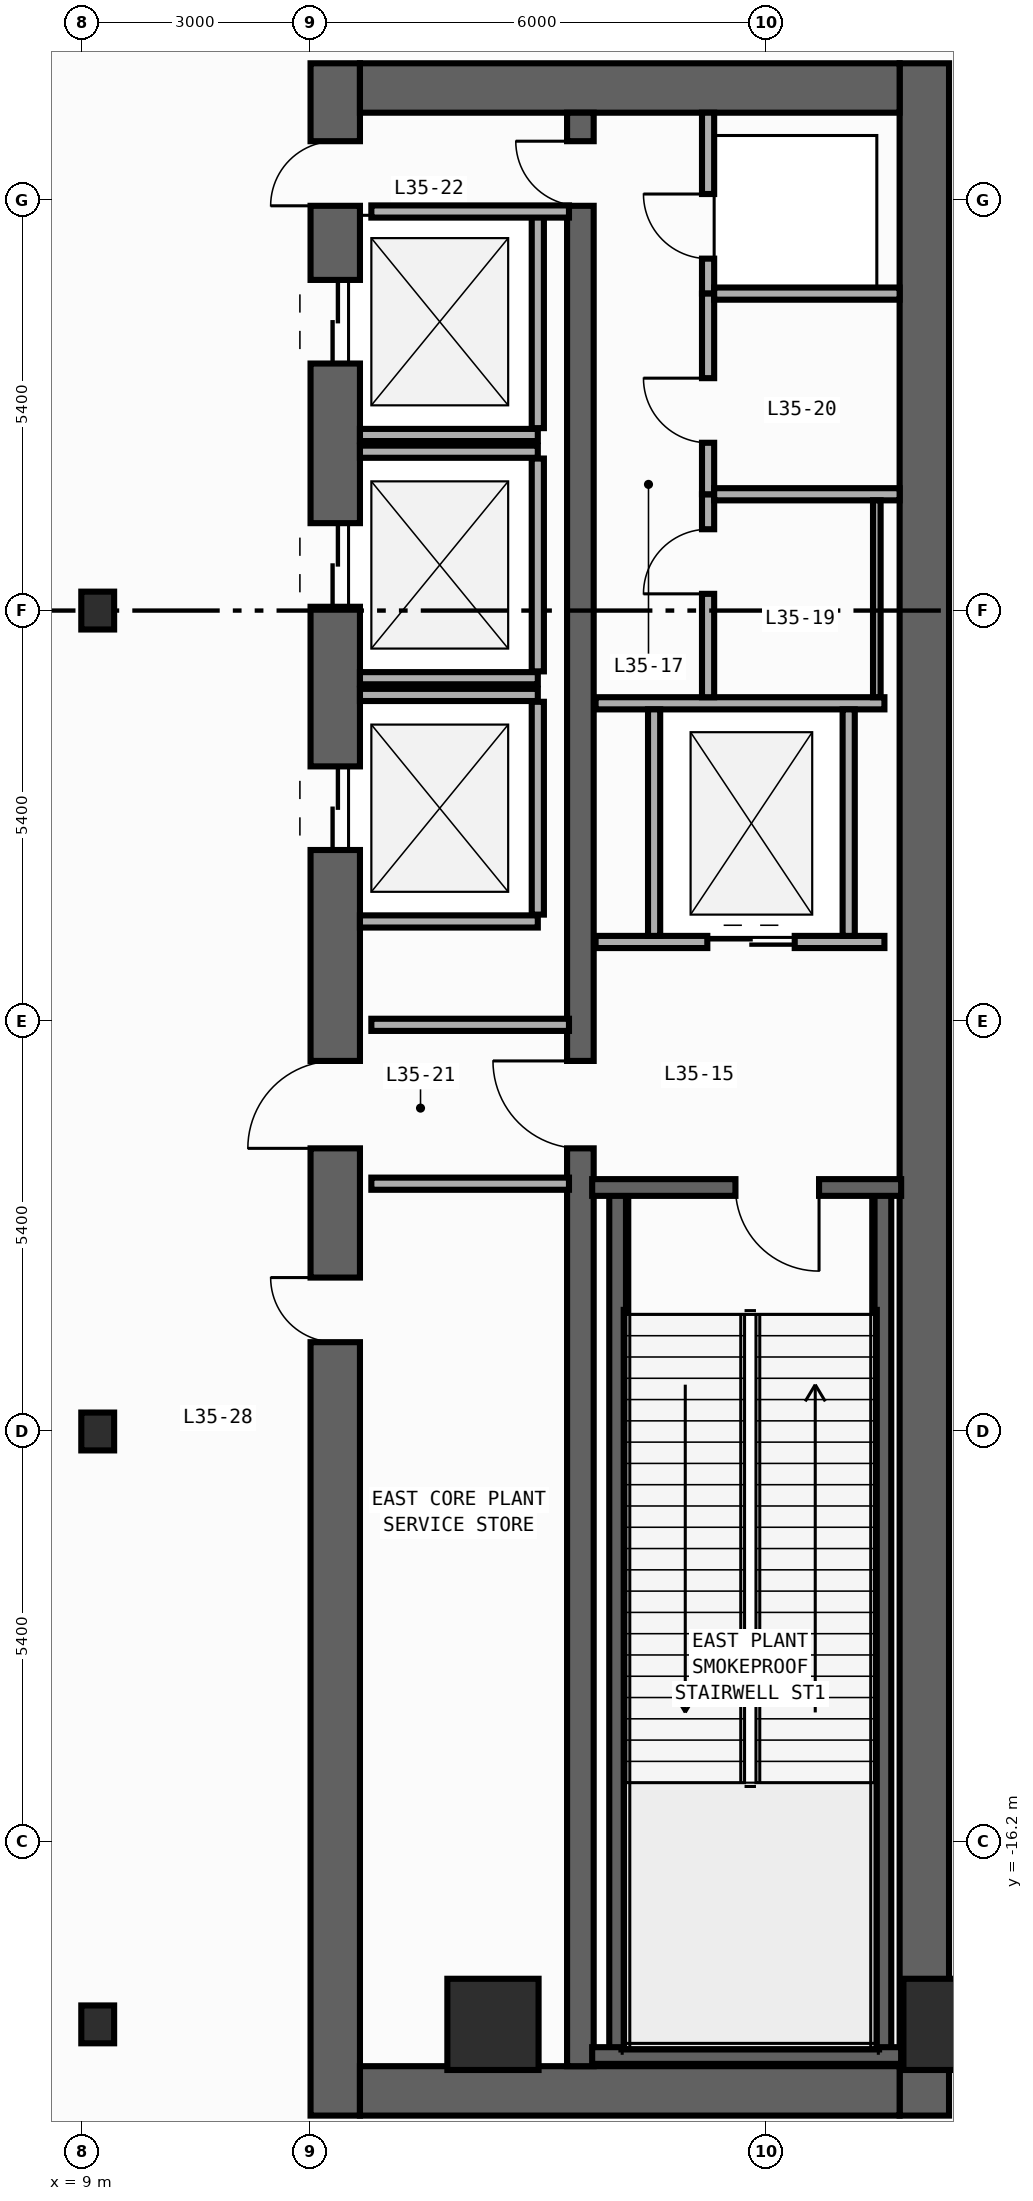
"""IFC4 building model, lengths in metres.
Left out: names, types, materials, properties, quantities, classifications, styles, units other than length and angle.
Written with IfcOpenShell. Run it as: python <this file> out.ifc"""

import sys

from ifc_helpers import new_model, si_unit, direction, frame, frame_2d, origin, origin_2d, place, context, subcontext, project, spatial, rectangle, i_section, extrude, element, fill, save


model = new_model("IFC4")
c1 = context("Model", 3, precision=1e-05, world=origin(), true_north=direction((0.0, 1.0)))
c2 = subcontext(c1, "Body", "Model", "MODEL_VIEW")
j1 = project(units=[si_unit("LENGTHUNIT", "METRE"), si_unit("PLANEANGLEUNIT", "RADIAN")], contexts=[c1])
p1 = place(None, origin())
s1 = spatial("IfcSite", under=j1, at=p1, CompositionType="ELEMENT")
p2 = place(p1, origin())
s2 = spatial("IfcBuilding", under=s1, at=p2, CompositionType="ELEMENT")
p3 = place(p2, frame((0.0, 0.0, 152.0)))
s3 = spatial("IfcBuildingStorey", under=s2, at=p3, CompositionType="ELEMENT", Elevation=152.0)
p4 = place(p3, frame((12.325, -19.8, 0.0), z_axis=(0.0, 0.0, 1.0), x_axis=(0.0, 1.0, 0.0)))
e1 = element("IfcWall", 1, at=p4, inside=s3, PredefinedType="SHEAR", context=c2, shape_type="SweptSolid", body=[
    extrude(rectangle(XDim=27.0, YDim=0.65, at=frame_2d((13.5, 0.0))), origin(), (0.0, 0.0, 1.0), 8.14),
])
p5 = place(p4, frame((23.05, 0.0, 0.0)))
e2 = element("IfcOpeningElement", 2, at=p5, cuts=e1, PredefinedType="OPENING", context=c2, shape_type="SweptSolid", body=[
    extrude(rectangle(XDim=1.1, YDim=2.2, at=frame_2d((0.55, 1.1))), frame((0.0, 0.335, 0.0), z_axis=(0.0, -1.0, 0.0), x_axis=(1.0, 0.0, 0.0)), (0.0, 0.0, 1.0), 0.67),
])
p6 = place(p4, frame((19.85, 0.0, 0.0)))
e3 = element("IfcOpeningElement", 3, at=p6, cuts=e1, PredefinedType="OPENING", context=c2, shape_type="SweptSolid", body=[
    extrude(rectangle(XDim=1.1, YDim=2.2, at=frame_2d((0.55, 1.1))), frame((0.0, 0.335, 0.0), z_axis=(0.0, -1.0, 0.0), x_axis=(1.0, 0.0, 0.0)), (0.0, 0.0, 1.0), 0.67),
])
p7 = place(p4, frame((16.65, 0.0, 0.0)))
e4 = element("IfcOpeningElement", 4, at=p7, cuts=e1, PredefinedType="OPENING", context=c2, shape_type="SweptSolid", body=[
    extrude(rectangle(XDim=1.1, YDim=2.2, at=frame_2d((0.55, 1.1))), frame((0.0, 0.335, 0.0), z_axis=(0.0, -1.0, 0.0), x_axis=(1.0, 0.0, 0.0)), (0.0, 0.0, 1.0), 0.67),
])
p8 = place(p4, frame((10.175, 0.0, 0.0)))
e5 = element("IfcOpeningElement", 5, at=p8, cuts=e1, PredefinedType="OPENING", context=c2, shape_type="SweptSolid", body=[
    extrude(rectangle(XDim=0.85, YDim=2.1, at=frame_2d((0.425, 1.05))), frame((0.0, 0.335, 0.0), z_axis=(0.0, -1.0, 0.0), x_axis=(1.0, 0.0, 0.0)), (0.0, 0.0, 1.0), 0.67),
])
p9 = place(p4, frame((12.725, 0.0, 0.0)))
e6 = element("IfcOpeningElement", 6, at=p9, cuts=e1, PredefinedType="OPENING", context=c2, shape_type="SweptSolid", body=[
    extrude(rectangle(XDim=1.15, YDim=2.2, at=frame_2d((0.575, 1.1))), frame((0.0, 0.335, 0.0), z_axis=(0.0, -1.0, 0.0), x_axis=(1.0, 0.0, 0.0)), (0.0, 0.0, 1.0), 0.67),
])
p10 = place(p4, frame((25.125, 0.0, 0.0)))
e7 = element("IfcOpeningElement", 7, at=p10, cuts=e1, PredefinedType="OPENING", context=c2, shape_type="SweptSolid", body=[
    extrude(rectangle(XDim=0.85, YDim=2.1, at=frame_2d((0.425, 1.05))), frame((0.0, 0.335, 0.0), z_axis=(0.0, -1.0, 0.0), x_axis=(1.0, 0.0, 0.0)), (0.0, 0.0, 1.0), 0.67),
])
p11 = place(p3, frame((20.075, -19.8, 0.0), z_axis=(0.0, 0.0, 1.0), x_axis=(0.0, 1.0, 0.0)))
e8 = element("IfcWall", 8, at=p11, inside=s3, PredefinedType="SHEAR", context=c2, shape_type="SweptSolid", body=[
    extrude(rectangle(XDim=27.0, YDim=0.65, at=frame_2d((13.5, 0.0))), origin(), (0.0, 0.0, 1.0), 8.14),
])
for number, where, z_axis, x_axis in (
    (9, (12.65, -19.475, 0.0), (0.0, 0.0, 1.0), (1.0, 0.0, 0.0)),
    (10, (12.65, 6.875, 0.0), (0.0, 0.0, 1.0), (1.0, 0.0, 0.0)),
):
    element("IfcWall", number, at=place(p3, frame(where, z_axis=z_axis, x_axis=x_axis)), inside=s3, PredefinedType="SHEAR", context=c2, shape_type="SweptSolid", body=[
        extrude(rectangle(XDim=7.1, YDim=0.65, at=frame_2d((3.55, 0.0))), origin(), (0.0, 0.0, 1.0), 8.14),
    ])
p12 = place(p3, frame((15.55, -19.15, 0.0), z_axis=(0.0, 0.0, 1.0), x_axis=(0.0, 1.0, 0.0)))
e11 = element("IfcWall", 11, at=p12, inside=s3, PredefinedType="SHEAR", context=c2, shape_type="SweptSolid", body=[
    extrude(rectangle(XDim=25.7, YDim=0.35, at=frame_2d((12.85, 0.0))), origin(), (0.0, 0.0, 1.0), 8.14),
])
p13 = place(p12, frame((12.075, 0.0, 0.0)))
e12 = element("IfcOpeningElement", 12, at=p13, cuts=e11, PredefinedType="OPENING", context=c2, shape_type="SweptSolid", body=[
    extrude(rectangle(XDim=1.15, YDim=2.2, at=frame_2d((0.575, 1.1))), frame((0.0, 0.185, 0.0), z_axis=(0.0, -1.0, 0.0), x_axis=(1.0, 0.0, 0.0)), (0.0, 0.0, 1.0), 0.37),
])
p14 = place(p12, frame((24.475, 0.0, 0.0)))
e13 = element("IfcOpeningElement", 13, at=p14, cuts=e11, PredefinedType="OPENING", context=c2, shape_type="SweptSolid", body=[
    extrude(rectangle(XDim=0.85, YDim=2.1, at=frame_2d((0.425, 1.05))), frame((0.0, 0.185, 0.0), z_axis=(0.0, -1.0, 0.0), x_axis=(1.0, 0.0, 0.0)), (0.0, 0.0, 1.0), 0.37),
])
for number, where, z_axis, x_axis in (
    (14, (16.04, -19.01, 0.0), (0.0, 0.0, 1.0), (0.0, 1.0, 0.0)),
    (15, (19.53, -19.01, 0.0), (0.0, 0.0, 1.0), (0.0, 1.0, 0.0)),
):
    element("IfcWall", number, at=place(p3, frame(where, z_axis=z_axis, x_axis=x_axis)), inside=s3, PredefinedType="SHEAR", context=c2, shape_type="SweptSolid", body=[
        extrude(rectangle(XDim=11.42, YDim=0.22, at=frame_2d((5.71, 0.0))), origin(), (0.0, 0.0, 1.0), 8.14),
    ])
p15 = place(p3, frame((15.705, -19.01, 0.0), z_axis=(0.0, 0.0, 1.0), x_axis=(1.0, 0.0, 0.0)))
e16 = element("IfcWall", 16, at=p15, inside=s3, PredefinedType="SHEAR", context=c2, shape_type="SweptSolid", body=[
    extrude(rectangle(XDim=4.065, YDim=0.22, at=frame_2d((2.032, 0.0))), origin(), (0.0, 0.0, 1.0), 8.14),
])
p16 = place(p3, frame((19.77, -7.59, 0.0), z_axis=(0.0, 0.0, 1.0), x_axis=(-1.0, 0.0, 0.0)))
e17 = element("IfcWall", 17, at=p16, inside=s3, PredefinedType="SHEAR", context=c2, shape_type="SweptSolid", body=[
    extrude(rectangle(XDim=4.065, YDim=0.22, at=frame_2d((2.032, 0.0))), origin(), (0.0, 0.0, 1.0), 8.14),
])
p17 = place(p16, frame((1.08, 0.0, 0.0)))
e18 = element("IfcOpeningElement", 18, at=p17, cuts=e17, PredefinedType="OPENING", context=c2, shape_type="SweptSolid", body=[
    extrude(rectangle(XDim=1.1, YDim=2.2, at=frame_2d((0.55, 1.1))), frame((0.0, 0.12, 0.0), z_axis=(0.0, -1.0, 0.0), x_axis=(1.0, 0.0, 0.0)), (0.0, 0.0, 1.0), 0.24),
])
for number, where, z_axis, x_axis in (
    (19, (9.2, -18.6, 0.0), (0.0, 0.0, 1.0), (1.0, 0.0, 0.0)),
    (20, (9.2, -10.8, 0.0), (0.0, 0.0, 1.0), (1.0, 0.0, 0.0)),
    (21, (9.2, 0.0, 0.0), (0.0, 0.0, 1.0), (1.0, 0.0, 0.0)),
):
    element("IfcColumn", number, at=place(p3, frame(where, z_axis=z_axis, x_axis=x_axis)), inside=s3, PredefinedType="COLUMN", context=c2, shape_type="SweptSolid", body=[
        extrude(i_section(OverallWidth=0.432, OverallDepth=0.498, WebThickness=0.045, FlangeThickness=0.07, FilletRadius=0.022, at=origin_2d()), origin(), (0.0, 0.0, 1.0), 8.4),
    ])
for number, where, z_axis, x_axis in (
    (22, (20.4, -18.6, 0.0), (0.0, 0.0, 1.0), (1.0, 0.0, 0.0)),
    (23, (14.4, -18.6, 0.0), (0.0, 0.0, 1.0), (1.0, 0.0, 0.0)),
):
    element("IfcColumn", number, at=place(p3, frame(where, z_axis=z_axis, x_axis=x_axis)), inside=s3, PredefinedType="COLUMN", context=c2, shape_type="SweptSolid", body=[
        extrude(rectangle(XDim=1.2, YDim=1.2, at=origin_2d()), origin(), (0.0, 0.0, 1.0), 8.4),
    ])
p18 = place(p3, frame((12.65, 2.31, 0.0), z_axis=(0.0, 0.0, 1.0), x_axis=(1.0, 0.0, 0.0)))
e24 = element("IfcWall", 24, at=p18, inside=s3, PredefinedType="STANDARD", context=c2, shape_type="SweptSolid", body=[
    extrude(rectangle(XDim=2.34, YDim=0.16, at=frame_2d((1.17, 0.0))), origin(), (0.0, 0.0, 1.0), 8.14),
])
p19 = place(p3, frame((14.99, 2.4, 0.0), z_axis=(0.0, 0.0, 1.0), x_axis=(0.0, 1.0, 0.0)))
e25 = element("IfcWall", 25, at=p19, inside=s3, PredefinedType="STANDARD", context=c2, shape_type="SweptSolid", body=[
    extrude(rectangle(XDim=2.8, YDim=0.16, at=frame_2d((1.4, 0.0))), origin(), (0.0, 0.0, 1.0), 8.14),
])
for number, where, z_axis, x_axis in (
    (26, (12.65, -0.89, 0.0), (0.0, 0.0, 1.0), (1.0, 0.0, 0.0)),
    (27, (12.65, 2.09, 0.0), (0.0, 0.0, 1.0), (1.0, 0.0, 0.0)),
):
    element("IfcWall", number, at=place(p3, frame(where, z_axis=z_axis, x_axis=x_axis)), inside=s3, PredefinedType="STANDARD", context=c2, shape_type="SweptSolid", body=[
        extrude(rectangle(XDim=2.34, YDim=0.16, at=frame_2d((1.17, 0.0))), origin(), (0.0, 0.0, 1.0), 8.14),
    ])
p20 = place(p3, frame((14.99, -0.8, 0.0), z_axis=(0.0, 0.0, 1.0), x_axis=(0.0, 1.0, 0.0)))
e28 = element("IfcWall", 28, at=p20, inside=s3, PredefinedType="STANDARD", context=c2, shape_type="SweptSolid", body=[
    extrude(rectangle(XDim=2.8, YDim=0.16, at=frame_2d((1.4, 0.0))), origin(), (0.0, 0.0, 1.0), 8.14),
])
for number, where, z_axis, x_axis in (
    (29, (12.65, -4.09, 0.0), (0.0, 0.0, 1.0), (1.0, 0.0, 0.0)),
    (30, (12.65, -1.11, 0.0), (0.0, 0.0, 1.0), (1.0, 0.0, 0.0)),
):
    element("IfcWall", number, at=place(p3, frame(where, z_axis=z_axis, x_axis=x_axis)), inside=s3, PredefinedType="STANDARD", context=c2, shape_type="SweptSolid", body=[
        extrude(rectangle(XDim=2.34, YDim=0.16, at=frame_2d((1.17, 0.0))), origin(), (0.0, 0.0, 1.0), 8.14),
    ])
p21 = place(p3, frame((14.99, -4.0, 0.0), z_axis=(0.0, 0.0, 1.0), x_axis=(0.0, 1.0, 0.0)))
e31 = element("IfcWall", 31, at=p21, inside=s3, PredefinedType="STANDARD", context=c2, shape_type="SweptSolid", body=[
    extrude(rectangle(XDim=2.8, YDim=0.16, at=frame_2d((1.4, 0.0))), origin(), (0.0, 0.0, 1.0), 8.14),
])
p22 = place(p3, frame((15.75, -4.36, 0.0), z_axis=(0.0, 0.0, 1.0), x_axis=(1.0, 0.0, 0.0)))
e32 = element("IfcWall", 32, at=p22, inside=s3, PredefinedType="STANDARD", context=c2, shape_type="SweptSolid", body=[
    extrude(rectangle(XDim=3.8, YDim=0.16, at=frame_2d((1.9, 0.0))), origin(), (0.0, 0.0, 1.0), 8.14),
])
p23 = place(p22, frame((1.47, 0.0, 0.0)))
e33 = element("IfcOpeningElement", 33, at=p23, cuts=e32, PredefinedType="OPENING", context=c2, shape_type="SweptSolid", body=[
    extrude(rectangle(XDim=1.15, YDim=2.2, at=frame_2d((0.575, 1.1))), frame((0.0, 0.09, 0.0), z_axis=(0.0, -1.0, 0.0), x_axis=(1.0, 0.0, 0.0)), (0.0, 0.0, 1.0), 0.18),
])
p24 = place(p3, frame((15.75, -1.22, 0.0), z_axis=(0.0, 0.0, 1.0), x_axis=(1.0, 0.0, 0.0)))
e34 = element("IfcWall", 34, at=p24, inside=s3, PredefinedType="STANDARD", context=c2, shape_type="SweptSolid", body=[
    extrude(rectangle(XDim=3.8, YDim=0.16, at=frame_2d((1.9, 0.0))), origin(), (0.0, 0.0, 1.0), 8.14),
])
for number, where, z_axis, x_axis in (
    (35, (16.52, -4.28, 0.0), (0.0, 0.0, 1.0), (0.0, 1.0, 0.0)),
    (36, (19.08, -4.28, 0.0), (0.0, 0.0, 1.0), (0.0, 1.0, 0.0)),
):
    element("IfcWall", number, at=place(p3, frame(where, z_axis=z_axis, x_axis=x_axis)), inside=s3, PredefinedType="STANDARD", context=c2, shape_type="SweptSolid", body=[
        extrude(rectangle(XDim=2.98, YDim=0.16, at=frame_2d((1.49, 0.0))), origin(), (0.0, 0.0, 1.0), 8.14),
    ])
for number, where, z_axis, x_axis in (
    (37, (12.8, -5.45, 0.0), (0.0, 0.0, 1.0), (1.0, 0.0, 0.0)),
    (38, (12.8, -7.54, 0.0), (0.0, 0.0, 1.0), (1.0, 0.0, 0.0)),
    (39, (12.8, 5.25, 0.0), (0.0, 0.0, 1.0), (1.0, 0.0, 0.0)),
):
    element("IfcWall", number, at=place(p3, frame(where, z_axis=z_axis, x_axis=x_axis)), inside=s3, PredefinedType="STANDARD", context=c2, shape_type="SweptSolid", body=[
        extrude(rectangle(XDim=2.6, YDim=0.16, at=frame_2d((1.3, 0.0))), origin(), (0.0, 0.0, 1.0), 8.14),
    ])
p25 = place(p3, frame((17.23, 4.17, 0.0), z_axis=(0.0, 0.0, 1.0), x_axis=(0.0, 1.0, 0.0)))
e40 = element("IfcWall", 40, at=p25, inside=s3, PredefinedType="PARTITIONING", context=c2, shape_type="SweptSolid", body=[
    extrude(rectangle(XDim=2.38, YDim=0.16, at=frame_2d((1.19, 0.0))), origin(), (0.0, 0.0, 1.0), 8.14),
])
p26 = place(p25, frame((0.46, 0.0, 0.0)))
e41 = element("IfcOpeningElement", 41, at=p26, cuts=e40, PredefinedType="OPENING", context=c2, shape_type="SweptSolid", body=[
    extrude(rectangle(XDim=0.85, YDim=2.1, at=frame_2d((0.425, 1.05))), frame((0.0, 0.09, 0.0), z_axis=(0.0, -1.0, 0.0), x_axis=(1.0, 0.0, 0.0)), (0.0, 0.0, 1.0), 0.18),
])
p27 = place(p3, frame((17.23, -1.14, 0.0), z_axis=(0.0, 0.0, 1.0), x_axis=(0.0, 1.0, 0.0)))
e42 = element("IfcWall", 42, at=p27, inside=s3, PredefinedType="PARTITIONING", context=c2, shape_type="SweptSolid", body=[
    extrude(rectangle(XDim=2.67, YDim=0.16, at=frame_2d((1.335, 0.0))), origin(), (0.0, 0.0, 1.0), 8.14),
])
p28 = place(p27, frame((1.36, 0.0, 0.0)))
e43 = element("IfcOpeningElement", 43, at=p28, cuts=e42, PredefinedType="OPENING", context=c2, shape_type="SweptSolid", body=[
    extrude(rectangle(XDim=0.85, YDim=2.1, at=frame_2d((0.425, 1.05))), frame((0.0, 0.09, 0.0), z_axis=(0.0, -1.0, 0.0), x_axis=(1.0, 0.0, 0.0)), (0.0, 0.0, 1.0), 0.18),
])
p29 = place(p3, frame((17.23, 1.53, 0.0), z_axis=(0.0, 0.0, 1.0), x_axis=(0.0, 1.0, 0.0)))
e44 = element("IfcWall", 44, at=p29, inside=s3, PredefinedType="PARTITIONING", context=c2, shape_type="SweptSolid", body=[
    extrude(rectangle(XDim=2.64, YDim=0.16, at=frame_2d((1.32, 0.0))), origin(), (0.0, 0.0, 1.0), 8.14),
])
p30 = place(p29, frame((0.677, 0.0, 0.0)))
e45 = element("IfcOpeningElement", 45, at=p30, cuts=e44, PredefinedType="OPENING", context=c2, shape_type="SweptSolid", body=[
    extrude(rectangle(XDim=0.85, YDim=2.1, at=frame_2d((0.425, 1.05))), frame((0.0, 0.09, 0.0), z_axis=(0.0, -1.0, 0.0), x_axis=(1.0, 0.0, 0.0)), (0.0, 0.0, 1.0), 0.18),
])
for number, where, z_axis, x_axis in (
    (46, (17.31, 4.17, 0.0), (0.0, 0.0, 1.0), (1.0, 0.0, 0.0)),
    (47, (17.31, 1.53, 0.0), (0.0, 0.0, 1.0), (1.0, 0.0, 0.0)),
):
    element("IfcWall", number, at=place(p3, frame(where, z_axis=z_axis, x_axis=x_axis)), inside=s3, PredefinedType="PARTITIONING", context=c2, shape_type="SweptSolid", body=[
        extrude(rectangle(XDim=2.44, YDim=0.16, at=frame_2d((1.22, 0.0))), origin(), (0.0, 0.0, 1.0), 8.14),
    ])
p31 = place(p3, frame((19.45, 1.45, 0.0), z_axis=(0.0, 0.0, 1.0), x_axis=(0.0, -1.0, 0.0)))
e48 = element("IfcWall", 48, at=p31, inside=s3, PredefinedType="PARTITIONING", context=c2, shape_type="SweptSolid", body=[
    extrude(rectangle(XDim=2.59, YDim=0.1, at=frame_2d((1.295, 0.0))), origin(), (0.0, 0.0, 1.0), 8.14),
])
p32 = place(p17, origin())
e49 = element("IfcDoor", 49, at=p32, inside=s3, OperationType="SINGLE_SWING_LEFT", PredefinedType="DOOR", context=c2, shape_type="SweptSolid", body=[
    extrude(rectangle(XDim=1.1, YDim=2.2, at=frame_2d((0.55, 1.1))), frame((0.0, 0.025, 0.0), z_axis=(0.0, -1.0, 0.0), x_axis=(1.0, 0.0, 0.0)), (0.0, 0.0, 1.0), 0.05),
])
fill(e18, e49)
p33 = place(p5, origin())
e50 = element("IfcDoor", 50, at=p33, inside=s3, OperationType="DOUBLE_DOOR_SLIDING", PredefinedType="DOOR", context=c2, shape_type="SweptSolid", body=[
    extrude(rectangle(XDim=1.1, YDim=2.2, at=frame_2d((0.55, 1.1))), frame((0.0, 0.025, 0.0), z_axis=(0.0, -1.0, 0.0), x_axis=(1.0, 0.0, 0.0)), (0.0, 0.0, 1.0), 0.05),
])
fill(e2, e50)
p34 = place(p6, origin())
e51 = element("IfcDoor", 51, at=p34, inside=s3, OperationType="DOUBLE_DOOR_SLIDING", PredefinedType="DOOR", context=c2, shape_type="SweptSolid", body=[
    extrude(rectangle(XDim=1.1, YDim=2.2, at=frame_2d((0.55, 1.1))), frame((0.0, 0.025, 0.0), z_axis=(0.0, -1.0, 0.0), x_axis=(1.0, 0.0, 0.0)), (0.0, 0.0, 1.0), 0.05),
])
fill(e3, e51)
p35 = place(p7, origin())
e52 = element("IfcDoor", 52, at=p35, inside=s3, OperationType="DOUBLE_DOOR_SLIDING", PredefinedType="DOOR", context=c2, shape_type="SweptSolid", body=[
    extrude(rectangle(XDim=1.1, YDim=2.2, at=frame_2d((0.55, 1.1))), frame((0.0, 0.025, 0.0), z_axis=(0.0, -1.0, 0.0), x_axis=(1.0, 0.0, 0.0)), (0.0, 0.0, 1.0), 0.05),
])
fill(e4, e52)
p36 = place(p8, origin())
e53 = element("IfcDoor", 53, at=p36, inside=s3, OperationType="SINGLE_SWING_RIGHT", PredefinedType="DOOR", context=c2, shape_type="SweptSolid", body=[
    extrude(rectangle(XDim=0.85, YDim=2.1, at=frame_2d((0.425, 1.05))), frame((0.0, 0.025, 0.0), z_axis=(0.0, -1.0, 0.0), x_axis=(1.0, 0.0, 0.0)), (0.0, 0.0, 1.0), 0.05),
])
fill(e5, e53)
p37 = place(p9, origin())
e54 = element("IfcDoor", 54, at=p37, inside=s3, OperationType="SINGLE_SWING_LEFT", PredefinedType="DOOR", context=c2, shape_type="SweptSolid", body=[
    extrude(rectangle(XDim=1.15, YDim=2.2, at=frame_2d((0.575, 1.1))), frame((0.0, 0.025, 0.0), z_axis=(0.0, -1.0, 0.0), x_axis=(1.0, 0.0, 0.0)), (0.0, 0.0, 1.0), 0.05),
])
fill(e6, e54)
p38 = place(p13, origin())
e55 = element("IfcDoor", 55, at=p38, inside=s3, OperationType="SINGLE_SWING_RIGHT", PredefinedType="DOOR", context=c2, shape_type="SweptSolid", body=[
    extrude(rectangle(XDim=1.15, YDim=2.2, at=frame_2d((0.575, 1.1))), frame((0.0, 0.025, 0.0), z_axis=(0.0, -1.0, 0.0), x_axis=(1.0, 0.0, 0.0)), (0.0, 0.0, 1.0), 0.05),
])
fill(e12, e55)
p39 = place(p10, origin())
e56 = element("IfcDoor", 56, at=p39, inside=s3, OperationType="SINGLE_SWING_LEFT", PredefinedType="DOOR", context=c2, shape_type="SweptSolid", body=[
    extrude(rectangle(XDim=0.85, YDim=2.1, at=frame_2d((0.425, 1.05))), frame((0.0, 0.025, 0.0), z_axis=(0.0, -1.0, 0.0), x_axis=(1.0, 0.0, 0.0)), (0.0, 0.0, 1.0), 0.05),
])
fill(e7, e56)
p40 = place(p14, origin())
e57 = element("IfcDoor", 57, at=p40, inside=s3, OperationType="SINGLE_SWING_RIGHT", PredefinedType="DOOR", context=c2, shape_type="SweptSolid", body=[
    extrude(rectangle(XDim=0.85, YDim=2.1, at=frame_2d((0.425, 1.05))), frame((0.0, 0.025, 0.0), z_axis=(0.0, -1.0, 0.0), x_axis=(1.0, 0.0, 0.0)), (0.0, 0.0, 1.0), 0.05),
])
fill(e13, e57)
p41 = place(p23, origin())
e58 = element("IfcDoor", 58, at=p41, inside=s3, OperationType="DOUBLE_DOOR_SLIDING", PredefinedType="DOOR", context=c2, shape_type="SweptSolid", body=[
    extrude(rectangle(XDim=1.15, YDim=2.2, at=frame_2d((0.575, 1.1))), frame((0.0, 0.025, 0.0), z_axis=(0.0, -1.0, 0.0), x_axis=(1.0, 0.0, 0.0)), (0.0, 0.0, 1.0), 0.05),
])
fill(e33, e58)
p42 = place(p26, origin())
e59 = element("IfcDoor", 59, at=p42, inside=s3, OperationType="SINGLE_SWING_RIGHT", PredefinedType="DOOR", context=c2, shape_type="SweptSolid", body=[
    extrude(rectangle(XDim=0.85, YDim=2.1, at=frame_2d((0.425, 1.05))), frame((0.0, 0.025, 0.0), z_axis=(0.0, -1.0, 0.0), x_axis=(1.0, 0.0, 0.0)), (0.0, 0.0, 1.0), 0.05),
])
fill(e41, e59)
p43 = place(p28, origin())
e60 = element("IfcDoor", 60, at=p43, inside=s3, OperationType="SINGLE_SWING_LEFT", PredefinedType="DOOR", context=c2, shape_type="SweptSolid", body=[
    extrude(rectangle(XDim=0.85, YDim=2.1, at=frame_2d((0.425, 1.05))), frame((0.0, 0.025, 0.0), z_axis=(0.0, -1.0, 0.0), x_axis=(1.0, 0.0, 0.0)), (0.0, 0.0, 1.0), 0.05),
])
fill(e43, e60)
p44 = place(p30, origin())
e61 = element("IfcDoor", 61, at=p44, inside=s3, OperationType="SINGLE_SWING_RIGHT", PredefinedType="DOOR", context=c2, shape_type="SweptSolid", body=[
    extrude(rectangle(XDim=0.85, YDim=2.1, at=frame_2d((0.425, 1.05))), frame((0.0, 0.025, 0.0), z_axis=(0.0, -1.0, 0.0), x_axis=(1.0, 0.0, 0.0)), (0.0, 0.0, 1.0), 0.05),
])
fill(e45, e61)
save(model, sys.argv[1])
